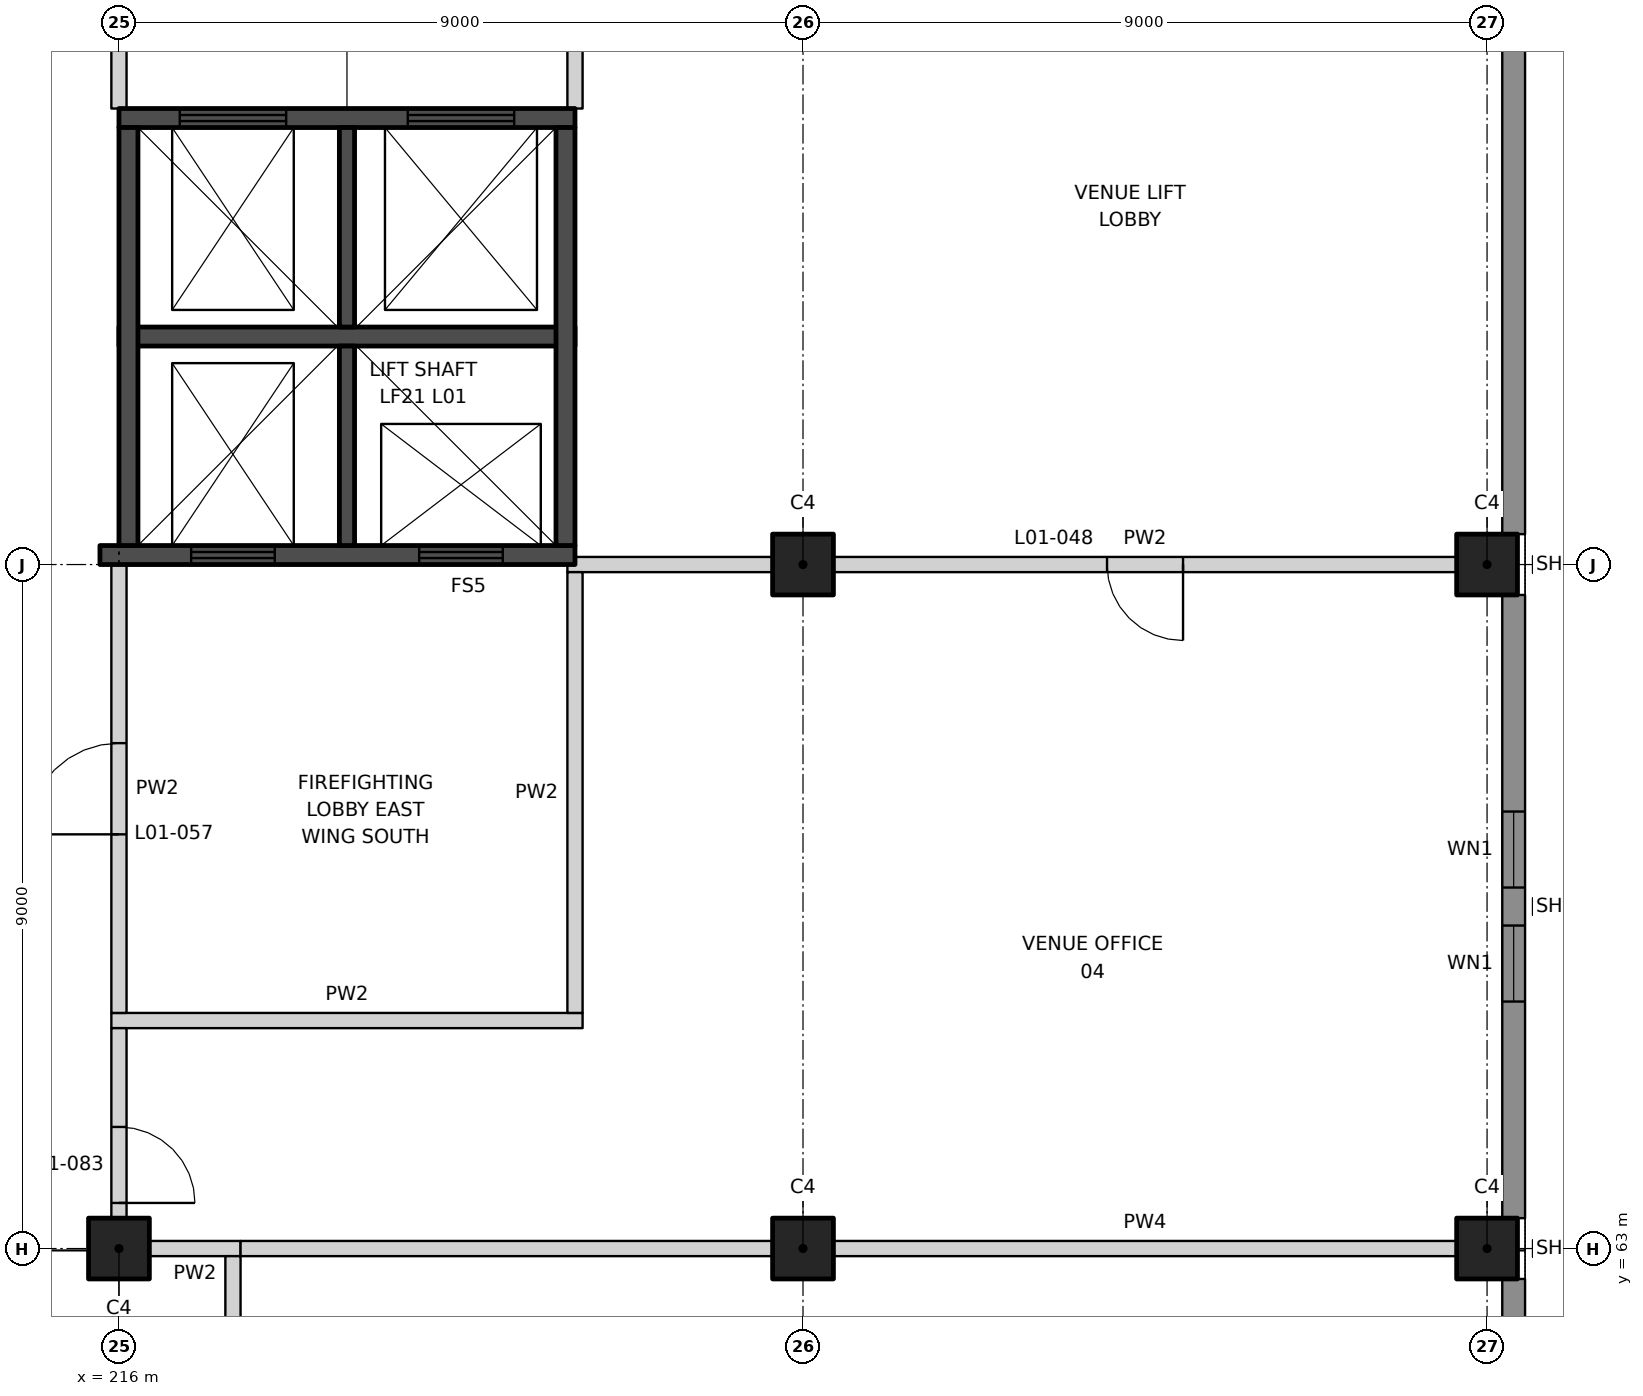
"""IFC4 building model, lengths in metres.
Left out: names, types, materials, properties, quantities, classifications, styles, units other than length and angle.
Written with IfcOpenShell. Run it as: python <this file> out.ifc"""

import sys

from ifc_helpers import new_model, si_unit, direction, frame, frame_2d, origin, origin_2d, place, context, subcontext, project, spatial, rectangle, extrude, element, fill, save


model = new_model("IFC4")
c1 = context("Model", 3, precision=1e-05, world=origin(), true_north=direction((0.0, 1.0)))
c2 = subcontext(c1, "Body", "Model", "MODEL_VIEW")
j1 = project(units=[si_unit("LENGTHUNIT", "METRE"), si_unit("PLANEANGLEUNIT", "RADIAN")], contexts=[c1])
p1 = place(None, origin())
s1 = spatial("IfcSite", under=j1, at=p1, CompositionType="ELEMENT")
p2 = place(p1, origin())
s2 = spatial("IfcBuilding", under=s1, at=p2, CompositionType="ELEMENT")
p3 = place(p2, frame((0.0, 0.0, 7.0)))
s3 = spatial("IfcBuildingStorey", under=s2, at=p3, CompositionType="ELEMENT", Elevation=7.0)
for number, where, z_axis, x_axis in (
    (1, (216.0, 63.0, 0.0), (0.0, 0.0, 1.0), (1.0, 0.0, 0.0)),
    (2, (225.0, 63.0, 0.0), (0.0, 0.0, 1.0), (1.0, 0.0, 0.0)),
    (3, (225.0, 72.0, 0.0), (0.0, 0.0, 1.0), (1.0, 0.0, 0.0)),
    (4, (234.0, 63.0, 0.0), (0.0, 0.0, 1.0), (1.0, 0.0, 0.0)),
    (5, (234.0, 72.0, 0.0), (0.0, 0.0, 1.0), (1.0, 0.0, 0.0)),
):
    element("IfcColumn", number, at=place(p3, frame(where, z_axis=z_axis, x_axis=x_axis)), inside=s3, PredefinedType="COLUMN", context=c2, shape_type="SweptSolid", body=[
        extrude(rectangle(XDim=0.8, YDim=0.8, at=origin_2d()), origin(), (0.0, 0.0, 1.0), 4.5),
    ])
p4 = place(p3, frame((216.4, 63.0, 0.0), z_axis=(0.0, 0.0, 1.0), x_axis=(1.0, 0.0, 0.0)))
e6 = element("IfcWall", 6, at=p4, inside=s3, PredefinedType="PARTITIONING", context=c2, shape_type="SweptSolid", body=[
    extrude(rectangle(XDim=1.2, YDim=0.2, at=frame_2d((0.6, 0.0))), origin(), (0.0, 0.0, 1.0), 3.25),
])
p5 = place(p3, frame((225.4, 63.0, 0.0), z_axis=(0.0, 0.0, 1.0), x_axis=(1.0, 0.0, 0.0)))
e7 = element("IfcWall", 7, at=p5, inside=s3, PredefinedType="PARTITIONING", context=c2, shape_type="SweptSolid", body=[
    extrude(rectangle(XDim=8.2, YDim=0.2, at=frame_2d((4.1, 0.0))), origin(), (0.0, 0.0, 1.0), 3.25),
])
p6 = place(p3, frame((217.6, 63.0, 0.0), z_axis=(0.0, 0.0, 1.0), x_axis=(1.0, 0.0, 0.0)))
e8 = element("IfcWall", 8, at=p6, inside=s3, PredefinedType="PARTITIONING", context=c2, shape_type="SweptSolid", body=[
    extrude(rectangle(XDim=7.0, YDim=0.2, at=frame_2d((3.5, 0.0))), origin(), (0.0, 0.0, 1.0), 3.25),
])
p7 = place(p3, frame((215.9, 66.0, 0.0), z_axis=(0.0, 0.0, 1.0), x_axis=(1.0, 0.0, 0.0)))
e9 = element("IfcWall", 9, at=p7, inside=s3, PredefinedType="PARTITIONING", context=c2, shape_type="SweptSolid", body=[
    extrude(rectangle(XDim=6.2, YDim=0.2, at=frame_2d((3.1, 0.0))), origin(), (0.0, 0.0, 1.0), 4.5),
])
p8 = place(p3, frame((225.4, 72.0, 0.0), z_axis=(0.0, 0.0, 1.0), x_axis=(1.0, 0.0, 0.0)))
e10 = element("IfcWall", 10, at=p8, inside=s3, PredefinedType="PARTITIONING", context=c2, shape_type="SweptSolid", body=[
    extrude(rectangle(XDim=8.2, YDim=0.2, at=frame_2d((4.1, 0.0))), origin(), (0.0, 0.0, 1.0), 3.25),
])
p9 = place(p8, frame((3.6, 0.0, 0.0)))
e11 = element("IfcOpeningElement", 11, at=p9, cuts=e10, PredefinedType="OPENING", context=c2, shape_type="SweptSolid", body=[
    extrude(rectangle(XDim=1.0, YDim=2.1, at=frame_2d((0.5, 1.05))), frame((0.0, 0.11, 0.0), z_axis=(0.0, -1.0, 0.0), x_axis=(1.0, 0.0, 0.0)), (0.0, 0.0, 1.0), 0.22),
])
p10 = place(p3, frame((221.9, 72.0, 0.0), z_axis=(0.0, 0.0, 1.0), x_axis=(1.0, 0.0, 0.0)))
e12 = element("IfcWall", 12, at=p10, inside=s3, PredefinedType="PARTITIONING", context=c2, shape_type="SweptSolid", body=[
    extrude(rectangle(XDim=2.7, YDim=0.2, at=frame_2d((1.35, 0.0))), origin(), (0.0, 0.0, 1.0), 3.45),
])
p11 = place(p3, frame((216.0, 63.4, 0.0), z_axis=(0.0, 0.0, 1.0), x_axis=(0.0, 1.0, 0.0)))
e13 = element("IfcWall", 13, at=p11, inside=s3, PredefinedType="PARTITIONING", context=c2, shape_type="SweptSolid", body=[
    extrude(rectangle(XDim=2.5, YDim=0.2, at=frame_2d((1.25, 0.0))), origin(), (0.0, 0.0, 1.0), 3.15),
])
p12 = place(p11, frame((0.2, 0.0, 0.0)))
e14 = element("IfcOpeningElement", 14, at=p12, cuts=e13, PredefinedType="OPENING", context=c2, shape_type="SweptSolid", body=[
    extrude(rectangle(XDim=1.0, YDim=2.1, at=frame_2d((0.5, 1.05))), frame((0.0, 0.11, 0.0), z_axis=(0.0, -1.0, 0.0), x_axis=(1.0, 0.0, 0.0)), (0.0, 0.0, 1.0), 0.22),
])
p13 = place(p3, frame((216.0, 66.1, 0.0), z_axis=(0.0, 0.0, 1.0), x_axis=(0.0, 1.0, 0.0)))
e15 = element("IfcWall", 15, at=p13, inside=s3, PredefinedType="PARTITIONING", context=c2, shape_type="SweptSolid", body=[
    extrude(rectangle(XDim=5.9, YDim=0.2, at=frame_2d((2.95, 0.0))), origin(), (0.0, 0.0, 1.0), 3.15),
])
p14 = place(p13, frame((2.35, 0.0, 0.0)))
e16 = element("IfcOpeningElement", 16, at=p14, cuts=e15, PredefinedType="OPENING", context=c2, shape_type="SweptSolid", body=[
    extrude(rectangle(XDim=1.2, YDim=2.1, at=frame_2d((0.6, 1.05))), frame((0.0, 0.11, 0.0), z_axis=(0.0, -1.0, 0.0), x_axis=(1.0, 0.0, 0.0)), (0.0, 0.0, 1.0), 0.22),
])
p15 = place(p3, frame((216.0, 78.0, 0.0), z_axis=(0.0, 0.0, 1.0), x_axis=(0.0, 1.0, 0.0)))
e17 = element("IfcWall", 17, at=p15, inside=s3, PredefinedType="PARTITIONING", context=c2, shape_type="SweptSolid", body=[
    extrude(rectangle(XDim=2.6, YDim=0.2, at=frame_2d((1.3, 0.0))), origin(), (0.0, 0.0, 1.0), 3.45),
])
p16 = place(p3, frame((217.5, 54.075, 0.0), z_axis=(0.0, 0.0, 1.0), x_axis=(0.0, 1.0, 0.0)))
e18 = element("IfcWall", 18, at=p16, inside=s3, PredefinedType="PARTITIONING", context=c2, shape_type="SweptSolid", body=[
    extrude(rectangle(XDim=8.825, YDim=0.2, at=frame_2d((4.413, 0.0))), origin(), (0.0, 0.0, 1.0), 4.5),
])
p17 = place(p16, frame((3.912, 0.0, 0.0)))
e19 = element("IfcOpeningElement", 19, at=p17, cuts=e18, PredefinedType="OPENING", context=c2, shape_type="SweptSolid", body=[
    extrude(rectangle(XDim=1.0, YDim=2.1, at=frame_2d((0.5, 1.05))), frame((0.0, 0.11, 0.0), z_axis=(0.0, -1.0, 0.0), x_axis=(1.0, 0.0, 0.0)), (0.0, 0.0, 1.0), 0.22),
])
p18 = place(p3, frame((222.0, 66.1, 0.0), z_axis=(0.0, 0.0, 1.0), x_axis=(0.0, 1.0, 0.0)))
e20 = element("IfcWall", 20, at=p18, inside=s3, PredefinedType="PARTITIONING", context=c2, shape_type="SweptSolid", body=[
    extrude(rectangle(XDim=5.8, YDim=0.2, at=frame_2d((2.9, 0.0))), origin(), (0.0, 0.0, 1.0), 4.5),
])
p19 = place(p3, frame((222.0, 78.0, 0.0), z_axis=(0.0, 0.0, 1.0), x_axis=(0.0, 1.0, 0.0)))
e21 = element("IfcWall", 21, at=p19, inside=s3, PredefinedType="PARTITIONING", context=c2, shape_type="SweptSolid", body=[
    extrude(rectangle(XDim=5.9, YDim=0.2, at=frame_2d((2.95, 0.0))), origin(), (0.0, 0.0, 1.0), 4.5),
])
p20 = place(p3, frame((234.35, 54.4, 0.0), z_axis=(0.0, 0.0, 1.0), x_axis=(0.0, 1.0, 0.0)))
e22 = element("IfcWall", 22, at=p20, inside=s3, PredefinedType="SOLIDWALL", context=c2, shape_type="SweptSolid", body=[
    extrude(rectangle(XDim=8.2, YDim=0.3, at=frame_2d((4.1, 0.0))), origin(), (0.0, 0.0, 1.0), 4.5),
])
p21 = place(p20, frame((2.85, 0.0, 0.9)))
e23 = element("IfcOpeningElement", 23, at=p21, cuts=e22, PredefinedType="OPENING", context=c2, shape_type="SweptSolid", body=[
    extrude(rectangle(XDim=1.0, YDim=2.1, at=frame_2d((0.5, 1.05))), frame((0.0, 0.16, 0.0), z_axis=(0.0, -1.0, 0.0), x_axis=(1.0, 0.0, 0.0)), (0.0, 0.0, 1.0), 0.32),
])
p22 = place(p20, frame((4.35, 0.0, 0.9)))
e24 = element("IfcOpeningElement", 24, at=p22, cuts=e22, PredefinedType="OPENING", context=c2, shape_type="SweptSolid", body=[
    extrude(rectangle(XDim=1.0, YDim=2.1, at=frame_2d((0.5, 1.05))), frame((0.0, 0.16, 0.0), z_axis=(0.0, -1.0, 0.0), x_axis=(1.0, 0.0, 0.0)), (0.0, 0.0, 1.0), 0.32),
])
p23 = place(p3, frame((234.35, 63.4, 0.0), z_axis=(0.0, 0.0, 1.0), x_axis=(0.0, 1.0, 0.0)))
e25 = element("IfcWall", 25, at=p23, inside=s3, PredefinedType="SOLIDWALL", context=c2, shape_type="SweptSolid", body=[
    extrude(rectangle(XDim=8.2, YDim=0.3, at=frame_2d((4.1, 0.0))), origin(), (0.0, 0.0, 1.0), 4.5),
])
p24 = place(p23, frame((2.85, 0.0, 0.9)))
e26 = element("IfcOpeningElement", 26, at=p24, cuts=e25, PredefinedType="OPENING", context=c2, shape_type="SweptSolid", body=[
    extrude(rectangle(XDim=1.0, YDim=2.1, at=frame_2d((0.5, 1.05))), frame((0.0, 0.16, 0.0), z_axis=(0.0, -1.0, 0.0), x_axis=(1.0, 0.0, 0.0)), (0.0, 0.0, 1.0), 0.32),
])
p25 = place(p23, frame((4.35, 0.0, 0.9)))
e27 = element("IfcOpeningElement", 27, at=p25, cuts=e25, PredefinedType="OPENING", context=c2, shape_type="SweptSolid", body=[
    extrude(rectangle(XDim=1.0, YDim=2.1, at=frame_2d((0.5, 1.05))), frame((0.0, 0.16, 0.0), z_axis=(0.0, -1.0, 0.0), x_axis=(1.0, 0.0, 0.0)), (0.0, 0.0, 1.0), 0.32),
])
p26 = place(p3, frame((234.35, 72.4, 0.0), z_axis=(0.0, 0.0, 1.0), x_axis=(0.0, 1.0, 0.0)))
e28 = element("IfcWall", 28, at=p26, inside=s3, PredefinedType="SOLIDWALL", context=c2, shape_type="SweptSolid", body=[
    extrude(rectangle(XDim=8.2, YDim=0.3, at=frame_2d((4.1, 0.0))), origin(), (0.0, 0.0, 1.0), 4.5),
])
p27 = place(p3, frame((215.75, 72.125, 0.0), z_axis=(0.0, 0.0, 1.0), x_axis=(1.0, 0.0, 0.0)))
e29 = element("IfcWall", 29, at=p27, inside=s3, PredefinedType="SHEAR", context=c2, shape_type="SweptSolid", body=[
    extrude(rectangle(XDim=6.25, YDim=0.25, at=frame_2d((3.125, 0.0))), origin(), (0.0, 0.0, 1.0), 4.15),
])
p28 = place(p27, frame((1.2, 0.0, 0.0)))
e30 = element("IfcOpeningElement", 30, at=p28, cuts=e29, PredefinedType="OPENING", context=c2, shape_type="SweptSolid", body=[
    extrude(rectangle(XDim=1.1, YDim=2.1, at=frame_2d((0.55, 1.05))), frame((0.0, 0.135, 0.0), z_axis=(0.0, -1.0, 0.0), x_axis=(1.0, 0.0, 0.0)), (0.0, 0.0, 1.0), 0.27),
])
p29 = place(p27, frame((4.2, 0.0, 0.0)))
e31 = element("IfcOpeningElement", 31, at=p29, cuts=e29, PredefinedType="OPENING", context=c2, shape_type="SweptSolid", body=[
    extrude(rectangle(XDim=1.1, YDim=2.1, at=frame_2d((0.55, 1.05))), frame((0.0, 0.135, 0.0), z_axis=(0.0, -1.0, 0.0), x_axis=(1.0, 0.0, 0.0)), (0.0, 0.0, 1.0), 0.27),
])
p30 = place(p3, frame((216.0, 77.875, 0.0), z_axis=(0.0, 0.0, 1.0), x_axis=(1.0, 0.0, 0.0)))
e32 = element("IfcWall", 32, at=p30, inside=s3, PredefinedType="SHEAR", context=c2, shape_type="SweptSolid", body=[
    extrude(rectangle(XDim=6.0, YDim=0.25, at=frame_2d((3.0, 0.0))), origin(), (0.0, 0.0, 1.0), 4.15),
])
p31 = place(p30, frame((0.8, 0.0, 0.0)))
e33 = element("IfcOpeningElement", 33, at=p31, cuts=e32, PredefinedType="OPENING", context=c2, shape_type="SweptSolid", body=[
    extrude(rectangle(XDim=1.4, YDim=2.1, at=frame_2d((0.7, 1.05))), frame((0.0, 0.135, 0.0), z_axis=(0.0, -1.0, 0.0), x_axis=(1.0, 0.0, 0.0)), (0.0, 0.0, 1.0), 0.27),
])
p32 = place(p30, frame((3.8, 0.0, 0.0)))
e34 = element("IfcOpeningElement", 34, at=p32, cuts=e32, PredefinedType="OPENING", context=c2, shape_type="SweptSolid", body=[
    extrude(rectangle(XDim=1.4, YDim=2.1, at=frame_2d((0.7, 1.05))), frame((0.0, 0.135, 0.0), z_axis=(0.0, -1.0, 0.0), x_axis=(1.0, 0.0, 0.0)), (0.0, 0.0, 1.0), 0.27),
])
p33 = place(p3, frame((216.0, 75.0, 0.0), z_axis=(0.0, 0.0, 1.0), x_axis=(1.0, 0.0, 0.0)))
e35 = element("IfcWall", 35, at=p33, inside=s3, PredefinedType="SHEAR", context=c2, shape_type="SweptSolid", body=[
    extrude(rectangle(XDim=6.0, YDim=0.25, at=frame_2d((3.0, 0.0))), origin(), (0.0, 0.0, 1.0), 4.15),
])
for number, where, z_axis, x_axis in (
    (36, (216.125, 72.25, 0.0), (0.0, 0.0, 1.0), (0.0, 1.0, 0.0)),
    (37, (221.875, 72.25, 0.0), (0.0, 0.0, 1.0), (0.0, 1.0, 0.0)),
):
    element("IfcWall", number, at=place(p3, frame(where, z_axis=z_axis, x_axis=x_axis)), inside=s3, PredefinedType="SHEAR", context=c2, shape_type="SweptSolid", body=[
        extrude(rectangle(XDim=5.5, YDim=0.25, at=frame_2d((2.75, 0.0))), origin(), (0.0, 0.0, 1.0), 4.15),
    ])
for number, where, z_axis, x_axis in (
    (38, (219.0, 72.25, 0.0), (0.0, 0.0, 1.0), (0.0, 1.0, 0.0)),
    (39, (219.0, 75.125, 0.0), (0.0, 0.0, 1.0), (0.0, 1.0, 0.0)),
):
    element("IfcWall", number, at=place(p3, frame(where, z_axis=z_axis, x_axis=x_axis)), inside=s3, PredefinedType="SHEAR", context=c2, shape_type="SweptSolid", body=[
        extrude(rectangle(XDim=2.625, YDim=0.2, at=frame_2d((1.312, 0.0))), origin(), (0.0, 0.0, 1.0), 4.15),
    ])
p34 = place(p9, frame((1.0, 0.0, 0.0), z_axis=(0.0, 0.0, 1.0), x_axis=(-1.0, 0.0, 0.0)))
e40 = element("IfcDoor", 40, at=p34, inside=s3, OperationType="SINGLE_SWING_LEFT", PredefinedType="DOOR", context=c2, shape_type="SweptSolid", body=[
    extrude(rectangle(XDim=1.0, YDim=2.1, at=frame_2d((0.5, 1.05))), frame((0.0, 0.025, 0.0), z_axis=(0.0, -1.0, 0.0), x_axis=(1.0, 0.0, 0.0)), (0.0, 0.0, 1.0), 0.05),
])
fill(e11, e40)
p35 = place(p14, origin())
e41 = element("IfcDoor", 41, at=p35, inside=s3, OperationType="SINGLE_SWING_LEFT", PredefinedType="DOOR", context=c2, shape_type="SweptSolid", body=[
    extrude(rectangle(XDim=1.2, YDim=2.1, at=frame_2d((0.6, 1.05))), frame((0.0, 0.025, 0.0), z_axis=(0.0, -1.0, 0.0), x_axis=(1.0, 0.0, 0.0)), (0.0, 0.0, 1.0), 0.05),
])
fill(e16, e41)
p36 = place(p12, frame((1.0, 0.0, 0.0), z_axis=(0.0, 0.0, 1.0), x_axis=(-1.0, 0.0, 0.0)))
e42 = element("IfcDoor", 42, at=p36, inside=s3, OperationType="SINGLE_SWING_RIGHT", PredefinedType="DOOR", context=c2, shape_type="SweptSolid", body=[
    extrude(rectangle(XDim=1.0, YDim=2.1, at=frame_2d((0.5, 1.05))), frame((0.0, 0.025, 0.0), z_axis=(0.0, -1.0, 0.0), x_axis=(1.0, 0.0, 0.0)), (0.0, 0.0, 1.0), 0.05),
])
fill(e14, e42)
p37 = place(p24, origin())
e43 = element("IfcWindow", 43, at=p37, inside=s3, PartitioningType="SINGLE_PANEL", PredefinedType="WINDOW", context=c2, shape_type="SweptSolid", body=[
    extrude(rectangle(XDim=1.0, YDim=2.1, at=frame_2d((0.5, 1.05))), frame((0.0, 0.03, 0.0), z_axis=(0.0, -1.0, 0.0), x_axis=(1.0, 0.0, 0.0)), (0.0, 0.0, 1.0), 0.06),
])
fill(e26, e43)
p38 = place(p25, origin())
e44 = element("IfcWindow", 44, at=p38, inside=s3, PartitioningType="SINGLE_PANEL", PredefinedType="WINDOW", context=c2, shape_type="SweptSolid", body=[
    extrude(rectangle(XDim=1.0, YDim=2.1, at=frame_2d((0.5, 1.05))), frame((0.0, 0.03, 0.0), z_axis=(0.0, -1.0, 0.0), x_axis=(1.0, 0.0, 0.0)), (0.0, 0.0, 1.0), 0.06),
])
fill(e27, e44)
p39 = place(p28, origin())
e45 = element("IfcDoor", 45, at=p39, inside=s3, OperationType="DOUBLE_DOOR_SLIDING", PredefinedType="DOOR", context=c2, shape_type="SweptSolid", body=[
    extrude(rectangle(XDim=1.1, YDim=2.1, at=frame_2d((0.55, 1.05))), frame((0.0, 0.025, 0.0), z_axis=(0.0, -1.0, 0.0), x_axis=(1.0, 0.0, 0.0)), (0.0, 0.0, 1.0), 0.05),
])
fill(e30, e45)
p40 = place(p29, origin())
e46 = element("IfcDoor", 46, at=p40, inside=s3, OperationType="DOUBLE_DOOR_SLIDING", PredefinedType="DOOR", context=c2, shape_type="SweptSolid", body=[
    extrude(rectangle(XDim=1.1, YDim=2.1, at=frame_2d((0.55, 1.05))), frame((0.0, 0.025, 0.0), z_axis=(0.0, -1.0, 0.0), x_axis=(1.0, 0.0, 0.0)), (0.0, 0.0, 1.0), 0.05),
])
fill(e31, e46)
p41 = place(p31, origin())
e47 = element("IfcDoor", 47, at=p41, inside=s3, OperationType="DOUBLE_DOOR_SLIDING", PredefinedType="DOOR", context=c2, shape_type="SweptSolid", body=[
    extrude(rectangle(XDim=1.4, YDim=2.1, at=frame_2d((0.7, 1.05))), frame((0.0, 0.025, 0.0), z_axis=(0.0, -1.0, 0.0), x_axis=(1.0, 0.0, 0.0)), (0.0, 0.0, 1.0), 0.05),
])
fill(e33, e47)
p42 = place(p32, origin())
e48 = element("IfcDoor", 48, at=p42, inside=s3, OperationType="DOUBLE_DOOR_SLIDING", PredefinedType="DOOR", context=c2, shape_type="SweptSolid", body=[
    extrude(rectangle(XDim=1.4, YDim=2.1, at=frame_2d((0.7, 1.05))), frame((0.0, 0.025, 0.0), z_axis=(0.0, -1.0, 0.0), x_axis=(1.0, 0.0, 0.0)), (0.0, 0.0, 1.0), 0.05),
])
fill(e34, e48)
save(model, sys.argv[1])
